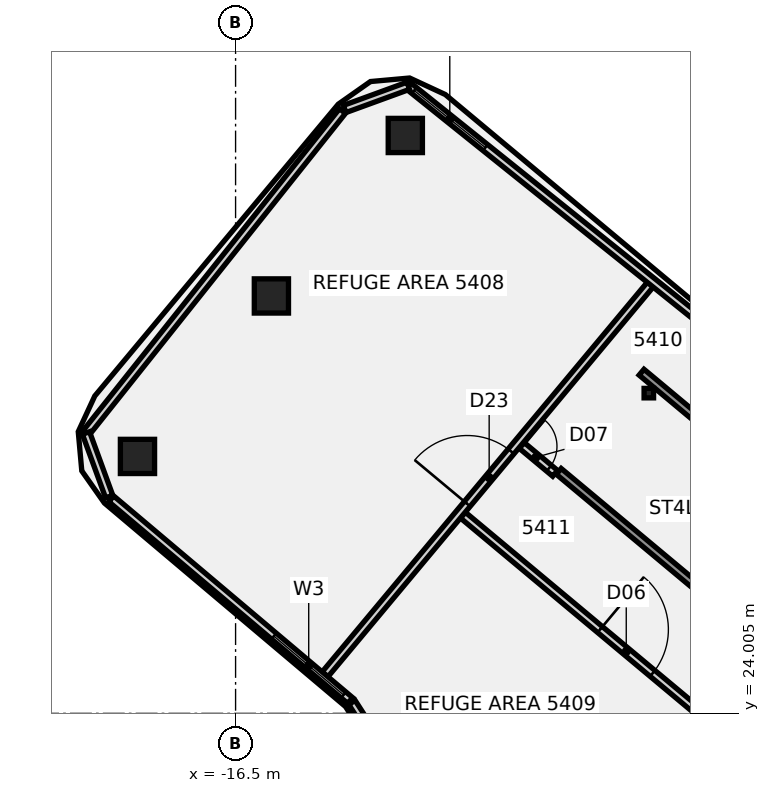
"""IFC4 building model, lengths in metres.
Left out: names, types, materials, properties, quantities, classifications, styles, units other than length and angle.
Written with IfcOpenShell. Run it as: python <this file> out.ifc"""

import sys

from ifc_helpers import new_model, si_unit, direction, frame, frame_2d, origin, origin_2d, place, context, subcontext, project, spatial, polyline, rectangle, outline, extrude, element, fill, save


model = new_model("IFC4")
c1 = context("Model", 3, precision=1e-05, world=origin(), true_north=direction((0.0, 1.0)))
c2 = subcontext(c1, "Body", "Model", "MODEL_VIEW")
j1 = project(units=[si_unit("LENGTHUNIT", "METRE"), si_unit("PLANEANGLEUNIT", "RADIAN")], contexts=[c1])
p1 = place(None, origin())
s1 = spatial("IfcSite", under=j1, at=p1, CompositionType="ELEMENT")
p2 = place(p1, origin())
s2 = spatial("IfcBuilding", under=s1, at=p2, CompositionType="ELEMENT")
p3 = place(p2, frame((0.0, 0.0, 214.9)))
s3 = spatial("IfcBuildingStorey", under=s2, at=p3, CompositionType="ELEMENT", Elevation=214.9)
p4 = place(p3, frame((-12.033, 39.206, -0.162), z_axis=(0.027306920099, -0.115134496444, 0.992974511175), x_axis=(0.641674118337, 0.763693023334, 0.070903398837)))
e1 = element("IfcColumn", 1, at=p4, inside=s3, PredefinedType="COLUMN", context=c2, shape_type="SweptSolid", body=[
    extrude(rectangle(XDim=0.9, YDim=0.9, at=origin_2d()), origin(), (0.0, 0.0, 1.0), 5.042),
])
p5 = place(p3, frame((-15.557, 34.983, -0.164), z_axis=(0.042488122715, -0.127416086189, 0.990938898423), x_axis=(0.642340953018, 0.763161584743, 0.070586795141)))
e2 = element("IfcColumn", 2, at=p5, inside=s3, PredefinedType="COLUMN", context=c2, shape_type="SweptSolid", body=[
    extrude(rectangle(XDim=0.9, YDim=0.9, at=origin_2d()), origin(), (0.0, 0.0, 1.0), 5.057),
])
p6 = place(p3, frame((-19.082, 30.761, -0.166), z_axis=(0.057608400723, -0.13956922481, 0.988535130206), x_axis=(0.642825150018, 0.76278629276, 0.070234593205)))
e3 = element("IfcColumn", 3, at=p6, inside=s3, PredefinedType="COLUMN", context=c2, shape_type="SweptSolid", body=[
    extrude(rectangle(XDim=0.9, YDim=0.9, at=origin_2d()), origin(), (0.0, 0.0, 1.0), 5.073),
])
p7 = place(p3, frame((-10.519, 29.217, 0.0), z_axis=(0.0, 0.0, 1.0), x_axis=(0.767759961509, -0.640737576161, 0.0)))
e4 = element("IfcWall", 4, at=p7, inside=s3, PredefinedType="PARTITIONING", context=c2, shape_type="SweptSolid", body=[
    extrude(rectangle(XDim=11.24, YDim=0.2, at=frame_2d((5.62, 0.0))), origin(), (0.0, 0.0, 1.0), 4.16),
])
p8 = place(p7, frame((9.8, 0.0, 0.0)))
e5 = element("IfcOpeningElement", 5, at=p8, cuts=e4, PredefinedType="OPENING", context=c2, shape_type="SweptSolid", body=[
    extrude(rectangle(XDim=1.0, YDim=2.1, at=frame_2d((0.5, 1.05))), frame((0.0, 0.11, 0.0), z_axis=(0.0, -1.0, 0.0), x_axis=(1.0, 0.0, 0.0)), (0.0, 0.0, 1.0), 0.22),
])
p9 = place(p7, frame((4.7, 0.0, 0.0)))
e6 = element("IfcOpeningElement", 6, at=p9, cuts=e4, PredefinedType="OPENING", context=c2, shape_type="SweptSolid", body=[
    extrude(rectangle(XDim=1.8, YDim=2.1, at=frame_2d((0.9, 1.05))), frame((0.0, 0.11, 0.0), z_axis=(0.0, -1.0, 0.0), x_axis=(1.0, 0.0, 0.0)), (0.0, 0.0, 1.0), 0.22),
])
p10 = place(p3, frame((-8.981, 31.059, 0.0), z_axis=(0.0, 0.0, 1.0), x_axis=(0.767720658374, -0.640784667971, 0.0)))
e7 = element("IfcWall", 7, at=p10, inside=s3, PredefinedType="PARTITIONING", context=c2, shape_type="SweptSolid", body=[
    extrude(rectangle(XDim=1.16, YDim=0.2, at=frame_2d((0.58, 0.0))), origin(), (0.0, 0.0, 1.0), 4.16),
])
p11 = place(p10, frame((0.05, 0.0, 0.0)))
e8 = element("IfcOpeningElement", 8, at=p11, cuts=e7, PredefinedType="OPENING", context=c2, shape_type="SweptSolid", body=[
    extrude(rectangle(XDim=0.9, YDim=2.1, at=frame_2d((0.45, 1.05))), frame((0.0, 0.11, 0.0), z_axis=(0.0, -1.0, 0.0), x_axis=(1.0, 0.0, 0.0)), (0.0, 0.0, 1.0), 0.22),
])
p12 = place(p3, frame((-14.145, 25.028, 0.0), z_axis=(0.0, 0.0, 1.0), x_axis=(0.640714977606, 0.767778820671, 0.0)))
e9 = element("IfcWall", 9, at=p12, inside=s3, PredefinedType="PARTITIONING", context=c2, shape_type="SweptSolid", body=[
    extrude(rectangle(XDim=13.438, YDim=0.2, at=frame_2d((6.719, 0.0))), origin(), (0.0, 0.0, 1.0), 4.16),
])
p13 = place(p12, frame((5.84, 0.0, 0.0)))
e10 = element("IfcOpeningElement", 10, at=p13, cuts=e9, PredefinedType="OPENING", context=c2, shape_type="SweptSolid", body=[
    extrude(rectangle(XDim=1.8, YDim=2.1, at=frame_2d((0.9, 1.05))), frame((0.0, 0.11, 0.0), z_axis=(0.0, -1.0, 0.0), x_axis=(1.0, 0.0, 0.0)), (0.0, 0.0, 1.0), 0.22),
])
p14 = place(p3, frame((-2.051, 32.569, 0.0), z_axis=(0.0, 0.0, 1.0), x_axis=(-0.780052154806, 0.625714500218, 0.0)))
e11 = element("IfcWall", 11, at=p14, inside=s3, PredefinedType="SOLIDWALL", context=c2, shape_type="SweptSolid", body=[
    extrude(rectangle(XDim=12.698, YDim=0.2, at=frame_2d((6.349, 0.0))), origin(), (0.0, 0.0, 1.0), 4.86),
])
p15 = place(p14, frame((10.098, 0.0, 1.4)))
e12 = element("IfcOpeningElement", 12, at=p15, cuts=e11, PredefinedType="OPENING", context=c2, shape_type="SweptSolid", body=[
    extrude(rectangle(XDim=2.4, YDim=2.1, at=frame_2d((1.2, 1.05))), frame((0.0, 0.11, 0.0), z_axis=(0.0, -1.0, 0.0), x_axis=(1.0, 0.0, 0.0)), (0.0, 0.0, 1.0), 0.22),
])
p16 = place(p3, frame((-11.955, 40.514, 0.0), z_axis=(0.0, 0.0, 1.0), x_axis=(-0.939424603146, -0.342755619945, 0.0)))
e13 = element("IfcWall", 13, at=p16, inside=s3, PredefinedType="SOLIDWALL", context=c2, shape_type="SweptSolid", body=[
    extrude(rectangle(XDim=1.781, YDim=0.2, at=frame_2d((0.89, 0.0))), origin(), (0.0, 0.0, 1.0), 4.86),
])
p17 = place(p3, frame((-13.687, 39.85, 0.0), z_axis=(0.0, 0.0, 1.0), x_axis=(-0.623074903355, -0.78216217296, 0.0)))
e14 = element("IfcWall", 14, at=p17, inside=s3, PredefinedType="SOLIDWALL", context=c2, shape_type="SweptSolid", body=[
    extrude(rectangle(XDim=10.833, YDim=0.2, at=frame_2d((5.417, 0.0))), origin(), (0.0, 0.0, 1.0), 4.86),
])
p18 = place(p3, frame((-20.436, 31.376, 0.0), z_axis=(0.0, 0.0, 1.0), x_axis=(0.342832454601, -0.939396565925, 0.0)))
e15 = element("IfcWall", 15, at=p18, inside=s3, PredefinedType="SOLIDWALL", context=c2, shape_type="SweptSolid", body=[
    extrude(rectangle(XDim=1.781, YDim=0.2, at=frame_2d((0.891, 0.0))), origin(), (0.0, 0.0, 1.0), 4.86),
])
p19 = place(p3, frame((-19.772, 29.645, 0.0), z_axis=(0.0, 0.0, 1.0), x_axis=(0.764192749459, -0.64498793917, 0.0)))
e16 = element("IfcWall", 16, at=p19, inside=s3, PredefinedType="SOLIDWALL", context=c2, shape_type="SweptSolid", body=[
    extrude(rectangle(XDim=8.227, YDim=0.2, at=frame_2d((4.114, 0.0))), origin(), (0.0, 0.0, 1.0), 4.86),
])
p20 = place(p19, frame((5.6, 0.0, 1.4)))
e17 = element("IfcOpeningElement", 17, at=p20, cuts=e16, PredefinedType="OPENING", context=c2, shape_type="SweptSolid", body=[
    extrude(rectangle(XDim=2.4, YDim=2.1, at=frame_2d((1.2, 1.05))), frame((0.0, 0.11, 0.0), z_axis=(0.0, -1.0, 0.0), x_axis=(1.0, 0.0, 0.0)), (0.0, 0.0, 1.0), 0.22),
])
p21 = place(p3, frame((-13.438, 24.287, 0.0), z_axis=(0.0, 0.0, 1.0), x_axis=(0.540343058881, -0.841444816205, 0.0)))
e18 = element("IfcWall", 18, at=p21, inside=s3, PredefinedType="SOLIDWALL", context=c2, shape_type="SweptSolid", body=[
    extrude(rectangle(XDim=1.369, YDim=0.2, at=frame_2d((0.685, 0.0))), origin(), (0.0, 0.0, 1.0), 4.86),
])
p22 = place(p3, frame((-2.852, 26.074, -0.18), z_axis=(0.0, 0.0, 1.0), x_axis=(-0.767728232678, 0.640775593129, 0.0)))
e19 = element("IfcWall", 19, at=p22, inside=s3, PredefinedType="SHEAR", context=c2, shape_type="SweptSolid", body=[
    extrude(rectangle(XDim=6.7, YDim=0.2, at=frame_2d((3.35, 0.0))), origin(), (0.0, 0.0, 1.0), 4.444),
])
p23 = place(p22, frame((0.35, 0.0, 0.0)))
e20 = element("IfcOpeningElement", 20, at=p23, cuts=e19, PredefinedType="OPENING", context=c2, shape_type="SweptSolid", body=[
    extrude(rectangle(XDim=1.0, YDim=2.1, at=frame_2d((0.5, 1.05))), frame((0.0, 0.11, 0.0), z_axis=(0.0, -1.0, 0.0), x_axis=(1.0, 0.0, 0.0)), (0.0, 0.0, 1.0), 0.22),
])
p24 = place(p3, frame((-0.674, 28.684, -0.18), z_axis=(0.0, 0.0, 1.0), x_axis=(-0.767713270537, 0.640793519195, 0.0)))
e21 = element("IfcWall", 21, at=p24, inside=s3, PredefinedType="SHEAR", context=c2, shape_type="SweptSolid", body=[
    extrude(rectangle(XDim=6.7, YDim=0.2, at=frame_2d((3.35, 0.0))), origin(), (0.0, 0.0, 1.0), 4.444),
])
p25 = place(p3, frame((0.0, 0.0, -0.18)))
e22 = element("IfcWall", 22, at=p25, inside=s3, PredefinedType="SHEAR", context=c2, shape_type="SweptSolid", body=[
    extrude(outline(polyline([(-5.728, 32.772), (-5.881, 32.9), (-7.932, 30.444), (-7.778, 30.316), (-5.728, 32.772)])), origin(), (0.0, 0.0, 1.0), 4.444),
])
p26 = place(p3, frame((-5.626, 32.427, -0.18), z_axis=(0.0, 0.0, 1.0), x_axis=(1.0, 0.0, 0.0)))
e23 = element("IfcColumn", 23, at=p26, inside=s3, PredefinedType="COLUMN", context=c2, shape_type="SweptSolid", body=[
    extrude(rectangle(XDim=0.25, YDim=0.25, at=origin_2d()), origin(), (0.0, 0.0, 1.0), 2.48),
])
p27 = place(p9, frame((1.8, 0.0, 0.0), z_axis=(0.0, 0.0, 1.0), x_axis=(-1.0, 0.0, 0.0)))
e24 = element("IfcDoor", 24, at=p27, inside=s3, OperationType="DOUBLE_DOOR_SINGLE_SWING", PredefinedType="DOOR", context=c2, shape_type="SweptSolid", body=[
    extrude(rectangle(XDim=1.8, YDim=2.1, at=frame_2d((0.9, 1.05))), frame((0.0, 0.025, 0.0), z_axis=(0.0, -1.0, 0.0), x_axis=(1.0, 0.0, 0.0)), (0.0, 0.0, 1.0), 0.05),
])
fill(e6, e24)
p28 = place(p11, origin())
e25 = element("IfcDoor", 25, at=p28, inside=s3, OperationType="SINGLE_SWING_RIGHT", PredefinedType="DOOR", context=c2, shape_type="SweptSolid", body=[
    extrude(rectangle(XDim=0.9, YDim=2.1, at=frame_2d((0.45, 1.05))), frame((0.0, 0.025, 0.0), z_axis=(0.0, -1.0, 0.0), x_axis=(1.0, 0.0, 0.0)), (0.0, 0.0, 1.0), 0.05),
])
fill(e8, e25)
p29 = place(p13, origin())
e26 = element("IfcDoor", 26, at=p29, inside=s3, OperationType="DOUBLE_DOOR_SINGLE_SWING", PredefinedType="DOOR", context=c2, shape_type="SweptSolid", body=[
    extrude(rectangle(XDim=1.8, YDim=2.1, at=frame_2d((0.9, 1.05))), frame((0.0, 0.025, 0.0), z_axis=(0.0, -1.0, 0.0), x_axis=(1.0, 0.0, 0.0)), (0.0, 0.0, 1.0), 0.05),
])
fill(e10, e26)
p30 = place(p15, origin())
e27 = element("IfcWindow", 27, at=p30, inside=s3, PartitioningType="SINGLE_PANEL", PredefinedType="WINDOW", context=c2, shape_type="SweptSolid", body=[
    extrude(rectangle(XDim=2.4, YDim=2.1, at=frame_2d((1.2, 1.05))), frame((0.0, 0.03, 0.0), z_axis=(0.0, -1.0, 0.0), x_axis=(1.0, 0.0, 0.0)), (0.0, 0.0, 1.0), 0.06),
])
fill(e12, e27)
p31 = place(p20, origin())
e28 = element("IfcWindow", 28, at=p31, inside=s3, PartitioningType="SINGLE_PANEL", PredefinedType="WINDOW", context=c2, shape_type="SweptSolid", body=[
    extrude(rectangle(XDim=2.4, YDim=2.1, at=frame_2d((1.2, 1.05))), frame((0.0, 0.03, 0.0), z_axis=(0.0, -1.0, 0.0), x_axis=(1.0, 0.0, 0.0)), (0.0, 0.0, 1.0), 0.06),
])
fill(e17, e28)
save(model, sys.argv[1])
